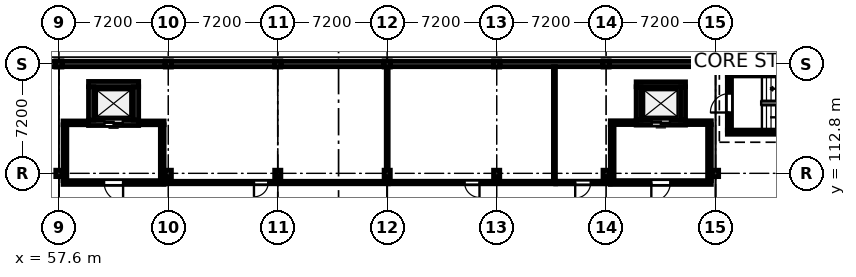
"""IFC4 building model, lengths in metres.
Left out: names, types, materials, properties, quantities, classifications, styles, units other than length and angle.
Written with IfcOpenShell. Run it as: python <this file> out.ifc"""

import sys

from ifc_helpers import new_model, si_unit, direction, frame, frame_2d, origin, origin_2d, place, context, subcontext, project, spatial, rectangle, i_section, extrude, element, fill, save


model = new_model("IFC4")
c1 = context("Model", 3, precision=1e-05, world=origin(), true_north=direction((0.0, 1.0)))
c2 = subcontext(c1, "Body", "Model", "MODEL_VIEW")
j1 = project(units=[si_unit("LENGTHUNIT", "METRE"), si_unit("PLANEANGLEUNIT", "RADIAN")], contexts=[c1])
p1 = place(None, origin())
s1 = spatial("IfcSite", under=j1, at=p1, CompositionType="ELEMENT")
p2 = place(p1, origin())
s2 = spatial("IfcBuilding", under=s1, at=p2, CompositionType="ELEMENT")
p3 = place(p2, frame((0.0, 0.0, -4.5)))
s3 = spatial("IfcBuildingStorey", under=s2, at=p3, CompositionType="ELEMENT", Elevation=-4.5)
p4 = place(p3, frame((57.6, 112.8, 0.0), z_axis=(0.0, 0.0, 1.0), x_axis=(1.0, 0.0, 0.0)))
e1 = element("IfcColumn", 1, at=p4, inside=s3, PredefinedType="COLUMN", context=c2, shape_type="SweptSolid", body=[
    extrude(i_section(OverallWidth=0.409, OverallDepth=0.424, WebThickness=0.033, FlangeThickness=0.052, FilletRadius=0.015, at=origin_2d()), origin(), (0.0, 0.0, 1.0), 4.5),
])
p5 = place(p3, frame((57.6, 120.0, 0.0), z_axis=(0.0, 0.0, 1.0), x_axis=(1.0, 0.0, 0.0)))
e2 = element("IfcColumn", 2, at=p5, inside=s3, PredefinedType="COLUMN", context=c2, shape_type="SweptSolid", body=[
    extrude(i_section(OverallWidth=0.404, OverallDepth=0.406, WebThickness=0.027, FlangeThickness=0.044, FilletRadius=0.015, at=origin_2d()), origin(), (0.0, 0.0, 1.0), 4.5),
])
p6 = place(p3, frame((64.8, 112.8, 0.0), z_axis=(0.0, 0.0, 1.0), x_axis=(1.0, 0.0, 0.0)))
e3 = element("IfcColumn", 3, at=p6, inside=s3, PredefinedType="COLUMN", context=c2, shape_type="SweptSolid", body=[
    extrude(i_section(OverallWidth=0.409, OverallDepth=0.424, WebThickness=0.033, FlangeThickness=0.052, FilletRadius=0.015, at=origin_2d()), origin(), (0.0, 0.0, 1.0), 4.5),
])
p7 = place(p3, frame((64.8, 120.0, 0.0), z_axis=(0.0, 0.0, 1.0), x_axis=(1.0, 0.0, 0.0)))
e4 = element("IfcColumn", 4, at=p7, inside=s3, PredefinedType="COLUMN", context=c2, shape_type="SweptSolid", body=[
    extrude(i_section(OverallWidth=0.404, OverallDepth=0.406, WebThickness=0.027, FlangeThickness=0.044, FilletRadius=0.015, at=origin_2d()), origin(), (0.0, 0.0, 1.0), 4.5),
])
p8 = place(p3, frame((72.0, 112.8, 0.0), z_axis=(0.0, 0.0, 1.0), x_axis=(1.0, 0.0, 0.0)))
e5 = element("IfcColumn", 5, at=p8, inside=s3, PredefinedType="COLUMN", context=c2, shape_type="SweptSolid", body=[
    extrude(i_section(OverallWidth=0.409, OverallDepth=0.424, WebThickness=0.033, FlangeThickness=0.052, FilletRadius=0.015, at=origin_2d()), origin(), (0.0, 0.0, 1.0), 4.5),
])
p9 = place(p3, frame((72.0, 120.0, 0.0), z_axis=(0.0, 0.0, 1.0), x_axis=(1.0, 0.0, 0.0)))
e6 = element("IfcColumn", 6, at=p9, inside=s3, PredefinedType="COLUMN", context=c2, shape_type="SweptSolid", body=[
    extrude(i_section(OverallWidth=0.404, OverallDepth=0.406, WebThickness=0.027, FlangeThickness=0.044, FilletRadius=0.015, at=origin_2d()), origin(), (0.0, 0.0, 1.0), 4.5),
])
p10 = place(p3, frame((79.2, 112.8, 0.0), z_axis=(0.0, 0.0, 1.0), x_axis=(1.0, 0.0, 0.0)))
e7 = element("IfcColumn", 7, at=p10, inside=s3, PredefinedType="COLUMN", context=c2, shape_type="SweptSolid", body=[
    extrude(i_section(OverallWidth=0.409, OverallDepth=0.424, WebThickness=0.033, FlangeThickness=0.052, FilletRadius=0.015, at=origin_2d()), origin(), (0.0, 0.0, 1.0), 4.5),
])
p11 = place(p3, frame((79.2, 120.0, 0.0), z_axis=(0.0, 0.0, 1.0), x_axis=(1.0, 0.0, 0.0)))
e8 = element("IfcColumn", 8, at=p11, inside=s3, PredefinedType="COLUMN", context=c2, shape_type="SweptSolid", body=[
    extrude(i_section(OverallWidth=0.404, OverallDepth=0.406, WebThickness=0.027, FlangeThickness=0.044, FilletRadius=0.015, at=origin_2d()), origin(), (0.0, 0.0, 1.0), 4.5),
])
p12 = place(p3, frame((86.4, 112.8, 0.0), z_axis=(0.0, 0.0, 1.0), x_axis=(1.0, 0.0, 0.0)))
e9 = element("IfcColumn", 9, at=p12, inside=s3, PredefinedType="COLUMN", context=c2, shape_type="SweptSolid", body=[
    extrude(i_section(OverallWidth=0.409, OverallDepth=0.424, WebThickness=0.033, FlangeThickness=0.052, FilletRadius=0.015, at=origin_2d()), origin(), (0.0, 0.0, 1.0), 4.5),
])
p13 = place(p3, frame((86.4, 120.0, 0.0), z_axis=(0.0, 0.0, 1.0), x_axis=(1.0, 0.0, 0.0)))
e10 = element("IfcColumn", 10, at=p13, inside=s3, PredefinedType="COLUMN", context=c2, shape_type="SweptSolid", body=[
    extrude(i_section(OverallWidth=0.404, OverallDepth=0.406, WebThickness=0.027, FlangeThickness=0.044, FilletRadius=0.015, at=origin_2d()), origin(), (0.0, 0.0, 1.0), 4.5),
])
p14 = place(p3, frame((93.6, 112.8, 0.0), z_axis=(0.0, 0.0, 1.0), x_axis=(1.0, 0.0, 0.0)))
e11 = element("IfcColumn", 11, at=p14, inside=s3, PredefinedType="COLUMN", context=c2, shape_type="SweptSolid", body=[
    extrude(i_section(OverallWidth=0.409, OverallDepth=0.424, WebThickness=0.033, FlangeThickness=0.052, FilletRadius=0.015, at=origin_2d()), origin(), (0.0, 0.0, 1.0), 4.5),
])
p15 = place(p3, frame((93.6, 120.0, 0.0), z_axis=(0.0, 0.0, 1.0), x_axis=(1.0, 0.0, 0.0)))
e12 = element("IfcColumn", 12, at=p15, inside=s3, PredefinedType="COLUMN", context=c2, shape_type="SweptSolid", body=[
    extrude(i_section(OverallWidth=0.404, OverallDepth=0.406, WebThickness=0.027, FlangeThickness=0.044, FilletRadius=0.015, at=origin_2d()), origin(), (0.0, 0.0, 1.0), 4.5),
])
p16 = place(p3, frame((100.8, 112.8, 0.0), z_axis=(0.0, 0.0, 1.0), x_axis=(1.0, 0.0, 0.0)))
e13 = element("IfcColumn", 13, at=p16, inside=s3, PredefinedType="COLUMN", context=c2, shape_type="SweptSolid", body=[
    extrude(i_section(OverallWidth=0.409, OverallDepth=0.424, WebThickness=0.033, FlangeThickness=0.052, FilletRadius=0.015, at=origin_2d()), origin(), (0.0, 0.0, 1.0), 4.5),
])
p17 = place(p3, frame((100.8, 120.0, 0.0), z_axis=(0.0, 0.0, 1.0), x_axis=(1.0, 0.0, 0.0)))
e14 = element("IfcColumn", 14, at=p17, inside=s3, PredefinedType="COLUMN", context=c2, shape_type="SweptSolid", body=[
    extrude(i_section(OverallWidth=0.404, OverallDepth=0.406, WebThickness=0.027, FlangeThickness=0.044, FilletRadius=0.015, at=origin_2d()), origin(), (0.0, 0.0, 1.0), 4.5),
])
p18 = place(p3, frame((50.609, 120.0, 0.0), z_axis=(0.0, 0.0, 1.0), x_axis=(1.0, 0.0, 0.0)))
e15 = element("IfcWall", 15, at=p18, inside=s3, PredefinedType="SOLIDWALL", context=c2, shape_type="SweptSolid", body=[
    extrude(rectangle(XDim=6.782, YDim=0.36, at=frame_2d((3.391, 0.0))), origin(), (0.0, 0.0, 1.0), 3.448),
])
for number, where, z_axis, x_axis in (
    (16, (57.809, 120.0, 0.0), (0.0, 0.0, 1.0), (1.0, 0.0, 0.0)),
    (17, (65.009, 120.0, 0.0), (0.0, 0.0, 1.0), (1.0, 0.0, 0.0)),
    (18, (72.209, 120.0, 0.0), (0.0, 0.0, 1.0), (1.0, 0.0, 0.0)),
    (19, (79.409, 120.0, 0.0), (0.0, 0.0, 1.0), (1.0, 0.0, 0.0)),
):
    element("IfcWall", number, at=place(p3, frame(where, z_axis=z_axis, x_axis=x_axis)), inside=s3, PredefinedType="SOLIDWALL", context=c2, shape_type="SweptSolid", body=[
        extrude(rectangle(XDim=6.782, YDim=0.36, at=frame_2d((3.391, 0.0))), origin(), (0.0, 0.0, 1.0), 3.448),
    ])
p19 = place(p3, frame((86.609, 120.0, 0.0), z_axis=(0.0, 0.0, 1.0), x_axis=(1.0, 0.0, 0.0)))
e20 = element("IfcWall", 20, at=p19, inside=s3, PredefinedType="SOLIDWALL", context=c2, shape_type="SweptSolid", body=[
    extrude(rectangle(XDim=6.782, YDim=0.36, at=frame_2d((3.391, 0.0))), origin(), (0.0, 0.0, 1.0), 3.448),
])
for number, where, z_axis, x_axis in (
    (21, (93.809, 120.0, 0.0), (0.0, 0.0, 1.0), (1.0, 0.0, 0.0)),
    (22, (101.009, 120.0, 0.0), (0.0, 0.0, 1.0), (1.0, 0.0, 0.0)),
):
    element("IfcWall", number, at=place(p3, frame(where, z_axis=z_axis, x_axis=x_axis)), inside=s3, PredefinedType="SOLIDWALL", context=c2, shape_type="SweptSolid", body=[
        extrude(rectangle(XDim=6.782, YDim=0.36, at=frame_2d((3.391, 0.0))), origin(), (0.0, 0.0, 1.0), 3.448),
    ])
for number, where, z_axis, x_axis in (
    (23, (110.475, 115.512, 0.0), (0.0, 0.0, 1.0), (-1.0, 0.0, 0.0)),
    (24, (101.575, 119.348, 0.0), (0.0, 0.0, 1.0), (1.0, 0.0, 0.0)),
):
    element("IfcWall", number, at=place(p3, frame(where, z_axis=z_axis, x_axis=x_axis)), inside=s3, PredefinedType="SOLIDWALL", context=c2, shape_type="SweptSolid", body=[
        extrude(rectangle(XDim=8.9, YDim=0.275, at=frame_2d((4.45, 0.0))), origin(), (0.0, 0.0, 1.0), 4.22),
    ])
p20 = place(p3, frame((101.712, 115.65, 0.0), z_axis=(0.0, 0.0, 1.0), x_axis=(0.0, 1.0, 0.0)))
e25 = element("IfcWall", 25, at=p20, inside=s3, PredefinedType="SOLIDWALL", context=c2, shape_type="SweptSolid", body=[
    extrude(rectangle(XDim=3.56, YDim=0.275, at=frame_2d((1.78, 0.0))), origin(), (0.0, 0.0, 1.0), 4.22),
])
p21 = place(p20, frame((1.155, 0.0, 0.0)))
e26 = element("IfcOpeningElement", 26, at=p21, cuts=e25, PredefinedType="OPENING", context=c2, shape_type="SweptSolid", body=[
    extrude(rectangle(XDim=1.25, YDim=2.2, at=frame_2d((0.625, 1.1))), frame((0.0, 0.147, 0.0), z_axis=(0.0, -1.0, 0.0), x_axis=(1.0, 0.0, 0.0)), (0.0, 0.0, 1.0), 0.295),
])
p22 = place(p3, frame((62.85, 116.125, 0.0), z_axis=(0.0, 0.0, 1.0), x_axis=(-1.0, 0.0, 0.0)))
e27 = element("IfcWall", 27, at=p22, inside=s3, PredefinedType="SHEAR", context=c2, shape_type="SweptSolid", body=[
    extrude(rectangle(XDim=3.3, YDim=0.35, at=frame_2d((1.65, 0.0))), origin(), (0.0, 0.0, 1.0), 4.22),
])
p23 = place(p22, frame((1.05, 0.0, 0.0)))
e28 = element("IfcOpeningElement", 28, at=p23, cuts=e27, PredefinedType="OPENING", context=c2, shape_type="SweptSolid", body=[
    extrude(rectangle(XDim=1.2, YDim=2.2, at=frame_2d((0.6, 1.1))), frame((0.0, 0.185, 0.0), z_axis=(0.0, -1.0, 0.0), x_axis=(1.0, 0.0, 0.0)), (0.0, 0.0, 1.0), 0.37),
])
p24 = place(p3, frame((59.55, 118.675, 0.0), z_axis=(0.0, 0.0, 1.0), x_axis=(1.0, 0.0, 0.0)))
e29 = element("IfcWall", 29, at=p24, inside=s3, PredefinedType="SHEAR", context=c2, shape_type="SweptSolid", body=[
    extrude(rectangle(XDim=3.3, YDim=0.35, at=frame_2d((1.65, 0.0))), origin(), (0.0, 0.0, 1.0), 4.22),
])
for number, where, z_axis, x_axis in (
    (30, (59.725, 116.3, 0.0), (0.0, 0.0, 1.0), (0.0, 1.0, 0.0)),
    (31, (62.675, 118.5, 0.0), (0.0, 0.0, 1.0), (0.0, -1.0, 0.0)),
):
    element("IfcWall", number, at=place(p3, frame(where, z_axis=z_axis, x_axis=x_axis)), inside=s3, PredefinedType="SHEAR", context=c2, shape_type="SweptSolid", body=[
        extrude(rectangle(XDim=2.2, YDim=0.35, at=frame_2d((1.1, 0.0))), origin(), (0.0, 0.0, 1.0), 4.22),
    ])
p25 = place(p3, frame((98.825, 116.138, 0.0), z_axis=(0.0, 0.0, 1.0), x_axis=(-1.0, 0.0, 0.0)))
e32 = element("IfcWall", 32, at=p25, inside=s3, PredefinedType="SHEAR", context=c2, shape_type="SweptSolid", body=[
    extrude(rectangle(XDim=3.25, YDim=0.325, at=frame_2d((1.625, 0.0))), origin(), (0.0, 0.0, 1.0), 4.22),
])
p26 = place(p25, frame((1.025, 0.0, 0.0)))
e33 = element("IfcOpeningElement", 33, at=p26, cuts=e32, PredefinedType="OPENING", context=c2, shape_type="SweptSolid", body=[
    extrude(rectangle(XDim=1.2, YDim=2.2, at=frame_2d((0.6, 1.1))), frame((0.0, 0.172, 0.0), z_axis=(0.0, -1.0, 0.0), x_axis=(1.0, 0.0, 0.0)), (0.0, 0.0, 1.0), 0.345),
])
p27 = place(p3, frame((95.575, 118.662, 0.0), z_axis=(0.0, 0.0, 1.0), x_axis=(1.0, 0.0, 0.0)))
e34 = element("IfcWall", 34, at=p27, inside=s3, PredefinedType="SHEAR", context=c2, shape_type="SweptSolid", body=[
    extrude(rectangle(XDim=3.25, YDim=0.325, at=frame_2d((1.625, 0.0))), origin(), (0.0, 0.0, 1.0), 4.22),
])
for number, where, z_axis, x_axis in (
    (35, (95.738, 116.3, 0.0), (0.0, 0.0, 1.0), (0.0, 1.0, 0.0)),
    (36, (98.662, 118.5, 0.0), (0.0, 0.0, 1.0), (0.0, -1.0, 0.0)),
):
    element("IfcWall", number, at=place(p3, frame(where, z_axis=z_axis, x_axis=x_axis)), inside=s3, PredefinedType="SHEAR", context=c2, shape_type="SweptSolid", body=[
        extrude(rectangle(XDim=2.2, YDim=0.325, at=frame_2d((1.1, 0.0))), origin(), (0.0, 0.0, 1.0), 4.22),
    ])
p28 = place(p3, frame((64.525, 112.2, 0.0), z_axis=(0.0, 0.0, 1.0), x_axis=(-1.0, 0.0, 0.0)))
e37 = element("IfcWall", 37, at=p28, inside=s3, PredefinedType="PARTITIONING", context=c2, shape_type="SweptSolid", body=[
    extrude(rectangle(XDim=6.65, YDim=0.25, at=frame_2d((3.325, 0.0))), origin(), (0.0, 0.0, 1.0), 3.443),
])
p29 = place(p28, frame((2.7, 0.0, 0.0)))
e38 = element("IfcOpeningElement", 38, at=p29, cuts=e37, PredefinedType="OPENING", context=c2, shape_type="SweptSolid", body=[
    extrude(rectangle(XDim=1.25, YDim=2.2, at=frame_2d((0.625, 1.1))), frame((0.0, 0.135, 0.0), z_axis=(0.0, -1.0, 0.0), x_axis=(1.0, 0.0, 0.0)), (0.0, 0.0, 1.0), 0.27),
])
p30 = place(p3, frame((57.875, 116.125, 0.0), z_axis=(0.0, 0.0, 1.0), x_axis=(1.0, 0.0, 0.0)))
e39 = element("IfcWall", 39, at=p30, inside=s3, PredefinedType="PARTITIONING", context=c2, shape_type="SweptSolid", body=[
    extrude(rectangle(XDim=1.673, YDim=0.25, at=frame_2d((0.836, 0.0))), origin(), (0.0, 0.0, 1.0), 3.443),
])
p31 = place(p3, frame((62.852, 116.125, 0.0), z_axis=(0.0, 0.0, 1.0), x_axis=(1.0, 0.0, 0.0)))
e40 = element("IfcWall", 40, at=p31, inside=s3, PredefinedType="PARTITIONING", context=c2, shape_type="SweptSolid", body=[
    extrude(rectangle(XDim=1.673, YDim=0.25, at=frame_2d((0.836, 0.0))), origin(), (0.0, 0.0, 1.0), 3.443),
])
for number, where, z_axis, x_axis in (
    (41, (58.0, 112.327, 0.0), (0.0, 0.0, 1.0), (0.0, 1.0, 0.0)),
    (42, (64.4, 115.998, 0.0), (0.0, 0.0, 1.0), (0.0, -1.0, 0.0)),
):
    element("IfcWall", number, at=place(p3, frame(where, z_axis=z_axis, x_axis=x_axis)), inside=s3, PredefinedType="PARTITIONING", context=c2, shape_type="SweptSolid", body=[
        extrude(rectangle(XDim=3.671, YDim=0.25, at=frame_2d((1.835, 0.0))), origin(), (0.0, 0.0, 1.0), 3.443),
    ])
p32 = place(p3, frame((100.525, 112.2, 0.0), z_axis=(0.0, 0.0, 1.0), x_axis=(-1.0, 0.0, 0.0)))
e43 = element("IfcWall", 43, at=p32, inside=s3, PredefinedType="PARTITIONING", context=c2, shape_type="SweptSolid", body=[
    extrude(rectangle(XDim=6.65, YDim=0.25, at=frame_2d((3.325, 0.0))), origin(), (0.0, 0.0, 1.0), 3.443),
])
p33 = place(p32, frame((2.7, 0.0, 0.0)))
e44 = element("IfcOpeningElement", 44, at=p33, cuts=e43, PredefinedType="OPENING", context=c2, shape_type="SweptSolid", body=[
    extrude(rectangle(XDim=1.25, YDim=2.2, at=frame_2d((0.625, 1.1))), frame((0.0, 0.135, 0.0), z_axis=(0.0, -1.0, 0.0), x_axis=(1.0, 0.0, 0.0)), (0.0, 0.0, 1.0), 0.27),
])
for number, where, z_axis, x_axis in (
    (45, (93.875, 116.138, 0.0), (0.0, 0.0, 1.0), (1.0, 0.0, 0.0)),
    (46, (98.827, 116.138, 0.0), (0.0, 0.0, 1.0), (1.0, 0.0, 0.0)),
):
    element("IfcWall", number, at=place(p3, frame(where, z_axis=z_axis, x_axis=x_axis)), inside=s3, PredefinedType="PARTITIONING", context=c2, shape_type="SweptSolid", body=[
        extrude(rectangle(XDim=1.698, YDim=0.25, at=frame_2d((0.849, 0.0))), origin(), (0.0, 0.0, 1.0), 3.443),
    ])
for number, where, z_axis, x_axis in (
    (47, (94.0, 112.327, 0.0), (0.0, 0.0, 1.0), (0.0, 1.0, 0.0)),
    (48, (100.4, 116.011, 0.0), (0.0, 0.0, 1.0), (0.0, -1.0, 0.0)),
):
    element("IfcWall", number, at=place(p3, frame(where, z_axis=z_axis, x_axis=x_axis)), inside=s3, PredefinedType="PARTITIONING", context=c2, shape_type="SweptSolid", body=[
        extrude(rectangle(XDim=3.684, YDim=0.25, at=frame_2d((1.842, 0.0))), origin(), (0.0, 0.0, 1.0), 3.443),
    ])
p34 = place(p3, frame((79.28, 112.2, 0.0), z_axis=(0.0, 0.0, 1.0), x_axis=(-1.0, 0.0, 0.0)))
e49 = element("IfcWall", 49, at=p34, inside=s3, PredefinedType="PARTITIONING", context=c2, shape_type="SweptSolid", body=[
    extrude(rectangle(XDim=14.753, YDim=0.165, at=frame_2d((7.376, 0.0))), origin(), (0.0, 0.0, 1.0), 3.443),
])
p35 = place(p34, frame((7.906, 0.0, 0.0)))
e50 = element("IfcOpeningElement", 50, at=p35, cuts=e49, PredefinedType="OPENING", context=c2, shape_type="SweptSolid", body=[
    extrude(rectangle(XDim=0.94, YDim=2.1, at=frame_2d((0.47, 1.05))), frame((0.0, 0.093, 0.0), z_axis=(0.0, -1.0, 0.0), x_axis=(1.0, 0.0, 0.0)), (0.0, 0.0, 1.0), 0.185),
])
p36 = place(p3, frame((90.28, 112.2, 0.0), z_axis=(0.0, 0.0, 1.0), x_axis=(-1.0, 0.0, 0.0)))
e51 = element("IfcWall", 51, at=p36, inside=s3, PredefinedType="PARTITIONING", context=c2, shape_type="SweptSolid", body=[
    extrude(rectangle(XDim=10.998, YDim=0.17, at=frame_2d((5.499, 0.0))), origin(), (0.0, 0.0, 1.0), 3.443),
])
p37 = place(p36, frame((5.009, 0.0, 0.0)))
e52 = element("IfcOpeningElement", 52, at=p37, cuts=e51, PredefinedType="OPENING", context=c2, shape_type="SweptSolid", body=[
    extrude(rectangle(XDim=0.98, YDim=2.1, at=frame_2d((0.49, 1.05))), frame((0.0, 0.095, 0.0), z_axis=(0.0, -1.0, 0.0), x_axis=(1.0, 0.0, 0.0)), (0.0, 0.0, 1.0), 0.19),
])
p38 = place(p3, frame((93.873, 112.2, 0.0), z_axis=(0.0, 0.0, 1.0), x_axis=(-1.0, 0.0, 0.0)))
e53 = element("IfcWall", 53, at=p38, inside=s3, PredefinedType="PARTITIONING", context=c2, shape_type="SweptSolid", body=[
    extrude(rectangle(XDim=3.591, YDim=0.178, at=frame_2d((1.795, 0.0))), origin(), (0.0, 0.0, 1.0), 3.443),
])
p39 = place(p38, frame((1.286, 0.0, 0.0)))
e54 = element("IfcOpeningElement", 54, at=p39, cuts=e53, PredefinedType="OPENING", context=c2, shape_type="SweptSolid", body=[
    extrude(rectangle(XDim=1.02, YDim=2.1, at=frame_2d((0.51, 1.05))), frame((0.0, 0.099, 0.0), z_axis=(0.0, -1.0, 0.0), x_axis=(1.0, 0.0, 0.0)), (0.0, 0.0, 1.0), 0.198),
])
p40 = place(p3, frame((79.2, 119.818, 0.0), z_axis=(0.0, 0.0, 1.0), x_axis=(0.0, -1.0, 0.0)))
e55 = element("IfcWall", 55, at=p40, inside=s3, PredefinedType="PARTITIONING", context=c2, shape_type="SweptSolid", body=[
    extrude(rectangle(XDim=7.531, YDim=0.13, at=frame_2d((3.766, 0.0))), origin(), (0.0, 0.0, 1.0), 3.443),
])
p41 = place(p3, frame((90.2, 119.818, 0.0), z_axis=(0.0, 0.0, 1.0), x_axis=(0.0, -1.0, 0.0)))
e56 = element("IfcWall", 56, at=p41, inside=s3, PredefinedType="PARTITIONING", context=c2, shape_type="SweptSolid", body=[
    extrude(rectangle(XDim=7.527, YDim=0.135, at=frame_2d((3.764, 0.0))), origin(), (0.0, 0.0, 1.0), 3.443),
])
p42 = place(p21, origin())
e57 = element("IfcDoor", 57, at=p42, inside=s3, OperationType="SINGLE_SWING_LEFT", PredefinedType="DOOR", context=c2, shape_type="SweptSolid", body=[
    extrude(rectangle(XDim=1.25, YDim=2.2, at=frame_2d((0.625, 1.1))), frame((0.0, 0.025, 0.0), z_axis=(0.0, -1.0, 0.0), x_axis=(1.0, 0.0, 0.0)), (0.0, 0.0, 1.0), 0.05),
])
fill(e26, e57)
p43 = place(p23, origin())
e58 = element("IfcDoor", 58, at=p43, inside=s3, OperationType="DOUBLE_DOOR_SLIDING", PredefinedType="DOOR", context=c2, shape_type="SweptSolid", body=[
    extrude(rectangle(XDim=1.2, YDim=2.2, at=frame_2d((0.6, 1.1))), frame((0.0, 0.025, 0.0), z_axis=(0.0, -1.0, 0.0), x_axis=(1.0, 0.0, 0.0)), (0.0, 0.0, 1.0), 0.05),
])
fill(e28, e58)
p44 = place(p26, origin())
e59 = element("IfcDoor", 59, at=p44, inside=s3, OperationType="DOUBLE_DOOR_SLIDING", PredefinedType="DOOR", context=c2, shape_type="SweptSolid", body=[
    extrude(rectangle(XDim=1.2, YDim=2.2, at=frame_2d((0.6, 1.1))), frame((0.0, 0.025, 0.0), z_axis=(0.0, -1.0, 0.0), x_axis=(1.0, 0.0, 0.0)), (0.0, 0.0, 1.0), 0.05),
])
fill(e33, e59)
p45 = place(p29, origin())
e60 = element("IfcDoor", 60, at=p45, inside=s3, OperationType="SINGLE_SWING_LEFT", PredefinedType="DOOR", context=c2, shape_type="SweptSolid", body=[
    extrude(rectangle(XDim=1.25, YDim=2.2, at=frame_2d((0.625, 1.1))), frame((0.0, 0.025, 0.0), z_axis=(0.0, -1.0, 0.0), x_axis=(1.0, 0.0, 0.0)), (0.0, 0.0, 1.0), 0.05),
])
fill(e38, e60)
p46 = place(p33, origin())
e61 = element("IfcDoor", 61, at=p46, inside=s3, OperationType="SINGLE_SWING_RIGHT", PredefinedType="DOOR", context=c2, shape_type="SweptSolid", body=[
    extrude(rectangle(XDim=1.25, YDim=2.2, at=frame_2d((0.625, 1.1))), frame((0.0, 0.025, 0.0), z_axis=(0.0, -1.0, 0.0), x_axis=(1.0, 0.0, 0.0)), (0.0, 0.0, 1.0), 0.05),
])
fill(e44, e61)
p47 = place(p35, origin())
e62 = element("IfcDoor", 62, at=p47, inside=s3, OperationType="SINGLE_SWING_RIGHT", PredefinedType="DOOR", context=c2, shape_type="SweptSolid", body=[
    extrude(rectangle(XDim=0.94, YDim=2.1, at=frame_2d((0.47, 1.05))), frame((0.0, 0.025, 0.0), z_axis=(0.0, -1.0, 0.0), x_axis=(1.0, 0.0, 0.0)), (0.0, 0.0, 1.0), 0.05),
])
fill(e50, e62)
p48 = place(p37, origin())
e63 = element("IfcDoor", 63, at=p48, inside=s3, OperationType="SINGLE_SWING_LEFT", PredefinedType="DOOR", context=c2, shape_type="SweptSolid", body=[
    extrude(rectangle(XDim=0.98, YDim=2.1, at=frame_2d((0.49, 1.05))), frame((0.0, 0.025, 0.0), z_axis=(0.0, -1.0, 0.0), x_axis=(1.0, 0.0, 0.0)), (0.0, 0.0, 1.0), 0.05),
])
fill(e52, e63)
p49 = place(p39, origin())
e64 = element("IfcDoor", 64, at=p49, inside=s3, OperationType="SINGLE_SWING_RIGHT", PredefinedType="DOOR", context=c2, shape_type="SweptSolid", body=[
    extrude(rectangle(XDim=1.02, YDim=2.1, at=frame_2d((0.51, 1.05))), frame((0.0, 0.025, 0.0), z_axis=(0.0, -1.0, 0.0), x_axis=(1.0, 0.0, 0.0)), (0.0, 0.0, 1.0), 0.05),
])
fill(e54, e64)
save(model, sys.argv[1])
